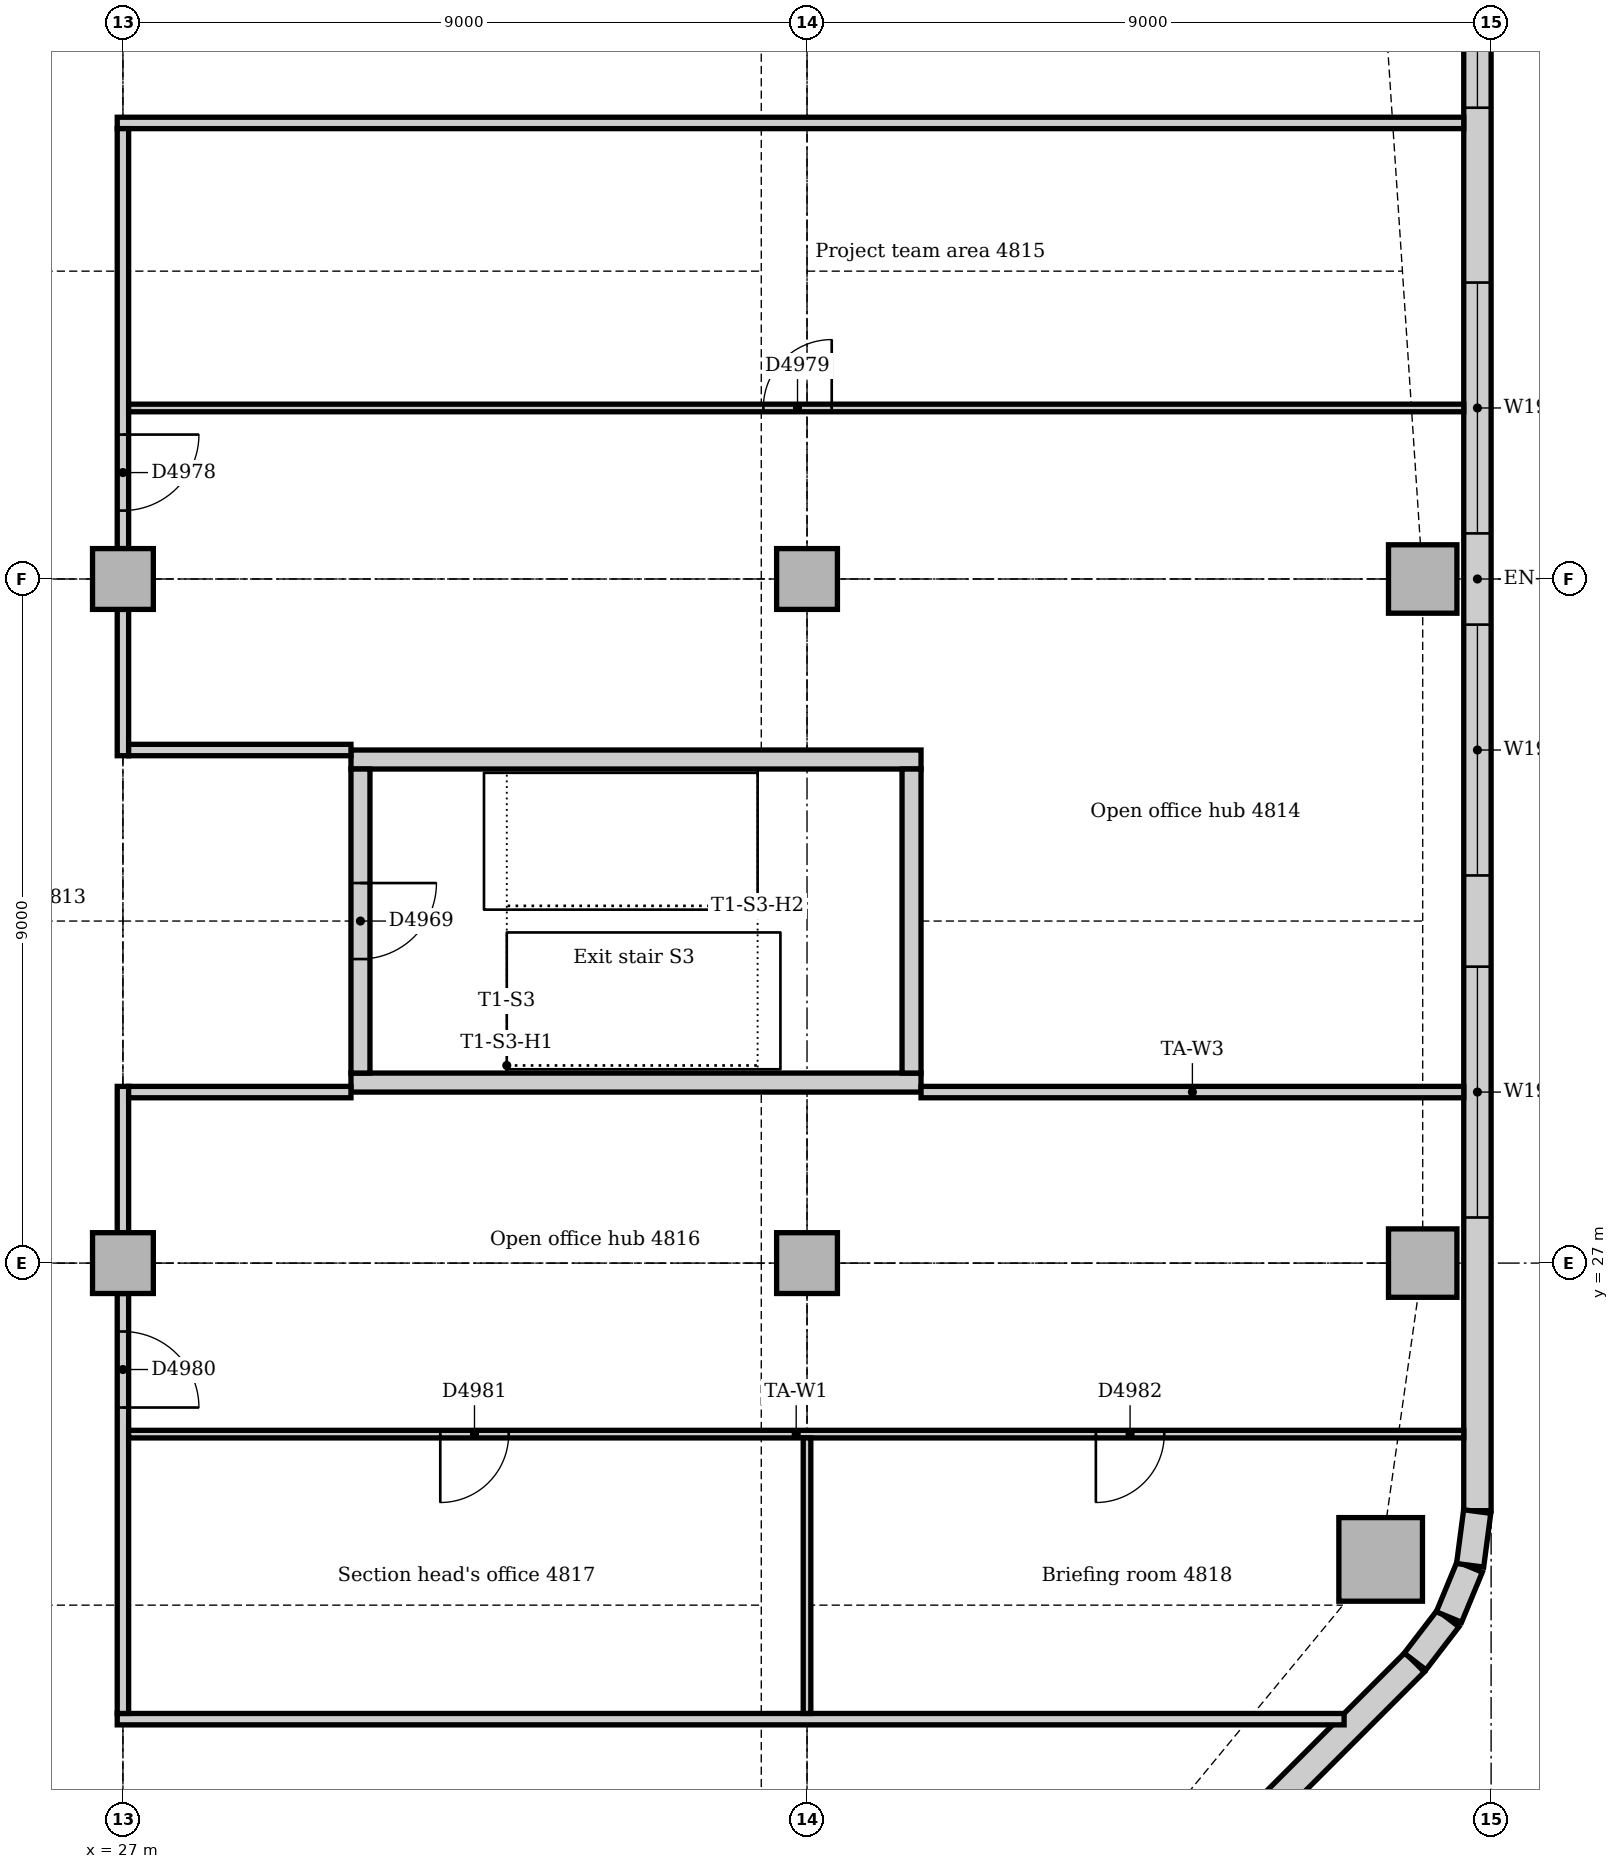
"""IFC4 building model, lengths in metres.
Left out: names, types, materials, properties, quantities, classifications, styles, units other than length and angle.
Written with IfcOpenShell. Run it as: python <this file> out.ifc"""

import sys

from ifc_helpers import new_model, si_unit, direction, frame, frame_2d, origin, origin_2d, place, context, subcontext, project, spatial, rectangle, extrude, element, fill, save


model = new_model("IFC4")
c1 = context("Model", 3, precision=1e-05, world=origin(), true_north=direction((0.0, 1.0)))
c2 = subcontext(c1, "Body", "Model", "MODEL_VIEW")
j1 = project(units=[si_unit("LENGTHUNIT", "METRE"), si_unit("PLANEANGLEUNIT", "RADIAN")], contexts=[c1])
p1 = place(None, origin())
s1 = spatial("IfcSite", under=j1, at=p1, CompositionType="ELEMENT")
p2 = place(p1, origin())
s2 = spatial("IfcBuilding", under=s1, at=p2, CompositionType="ELEMENT")
p3 = place(p2, frame((0.0, 0.0, 202.0)))
s3 = spatial("IfcBuildingStorey", under=s2, at=p3, CompositionType="ELEMENT", Elevation=202.0)
for number, where, z_axis, x_axis in (
    (1, (30.0, 29.375, 0.0), (0.0, 0.0, 1.0), (1.0, 0.0, 0.0)),
    (2, (37.5, 33.625, 0.0), (0.0, 0.0, 1.0), (-1.0, 0.0, 0.0)),
):
    element("IfcWall", number, at=place(p3, frame(where, z_axis=z_axis, x_axis=x_axis)), inside=s3, PredefinedType="SOLIDWALL", context=c2, shape_type="SweptSolid", body=[
        extrude(rectangle(XDim=7.5, YDim=0.25, at=frame_2d((3.75, 0.0))), origin(), (0.0, 0.0, 1.0), 4.0),
    ])
p4 = place(p3, frame((37.375, 29.5, 0.0), z_axis=(0.0, 0.0, 1.0), x_axis=(0.0, 1.0, 0.0)))
e3 = element("IfcWall", 3, at=p4, inside=s3, PredefinedType="SOLIDWALL", context=c2, shape_type="SweptSolid", body=[
    extrude(rectangle(XDim=4.0, YDim=0.25, at=frame_2d((2.0, 0.0))), origin(), (0.0, 0.0, 1.0), 4.0),
])
p5 = place(p3, frame((30.125, 33.5, 0.0), z_axis=(0.0, 0.0, 1.0), x_axis=(0.0, -1.0, 0.0)))
e4 = element("IfcWall", 4, at=p5, inside=s3, PredefinedType="SOLIDWALL", context=c2, shape_type="SweptSolid", body=[
    extrude(rectangle(XDim=4.0, YDim=0.25, at=frame_2d((2.0, 0.0))), origin(), (0.0, 0.0, 1.0), 4.0),
])
p6 = place(p5, frame((1.5, 0.0, 0.0)))
e5 = element("IfcOpeningElement", 5, at=p6, cuts=e4, PredefinedType="OPENING", context=c2, shape_type="SweptSolid", body=[
    extrude(rectangle(XDim=1.0, YDim=2.1, at=frame_2d((0.5, 1.05))), frame((0.0, 0.135, 0.0), z_axis=(0.0, -1.0, 0.0), x_axis=(1.0, 0.0, 0.0)), (0.0, 0.0, 1.0), 0.27),
])
p7 = place(p3, frame((43.547, 23.102, 0.0), z_axis=(0.0, 0.0, 1.0), x_axis=(1.0, 0.0, 0.0)))
e6 = element("IfcColumn", 6, at=p7, inside=s3, PredefinedType="COLUMN", context=c2, shape_type="SweptSolid", body=[
    extrude(rectangle(XDim=1.1, YDim=1.1, at=origin_2d()), origin(), (0.0, 0.0, 1.0), 3.85),
])
for number, where, z_axis, x_axis in (
    (7, (44.1, 27.0, 0.0), (0.0, 0.0, 1.0), (1.0, 0.0, 0.0)),
    (8, (44.1, 36.0, 0.0), (0.0, 0.0, 1.0), (1.0, 0.0, 0.0)),
):
    element("IfcColumn", number, at=place(p3, frame(where, z_axis=z_axis, x_axis=x_axis)), inside=s3, PredefinedType="COLUMN", context=c2, shape_type="SweptSolid", body=[
        extrude(rectangle(XDim=0.9, YDim=0.9, at=origin_2d()), origin(), (0.0, 0.0, 1.0), 3.85),
    ])
for number, where, z_axis, x_axis in (
    (9, (27.0, 27.0, 0.0), (0.0, 0.0, 1.0), (1.0, 0.0, 0.0)),
    (10, (27.0, 36.0, 0.0), (0.0, 0.0, 1.0), (1.0, 0.0, 0.0)),
    (11, (36.0, 27.0, 0.0), (0.0, 0.0, 1.0), (1.0, 0.0, 0.0)),
    (12, (36.0, 36.0, 0.0), (0.0, 0.0, 1.0), (1.0, 0.0, 0.0)),
):
    element("IfcColumn", number, at=place(p3, frame(where, z_axis=z_axis, x_axis=x_axis)), inside=s3, PredefinedType="COLUMN", context=c2, shape_type="SweptSolid", body=[
        extrude(rectangle(XDim=0.8, YDim=0.8, at=origin_2d()), origin(), (0.0, 0.0, 1.0), 3.85),
    ])
p8 = place(p3, frame((36.751, 14.506, 0.0), z_axis=(0.0, 0.0, 1.0), x_axis=(0.707106781187, 0.707106781187, 0.0)))
e13 = element("IfcWall", 13, at=p8, inside=s3, PredefinedType="STANDARD", context=c2, shape_type="SweptSolid", body=[
    extrude(rectangle(XDim=10.243, YDim=0.36, at=frame_2d((5.121, 0.0))), origin(), (0.0, 0.0, 1.0), 3.85),
])
p9 = place(p8, frame((5.021, 0.0, 0.9)))
e14 = element("IfcOpeningElement", 14, at=p9, cuts=e13, PredefinedType="OPENING", context=c2, shape_type="SweptSolid", body=[
    extrude(rectangle(XDim=1.8, YDim=1.6, at=frame_2d((0.9, 0.8))), frame((0.0, 0.19, 0.0), z_axis=(0.0, -1.0, 0.0), x_axis=(1.0, 0.0, 0.0)), (0.0, 0.0, 1.0), 0.38),
])
p10 = place(p3, frame((44.82, 23.743, 0.0), z_axis=(0.0, 0.0, 1.0), x_axis=(0.0, 1.0, 0.0)))
e15 = element("IfcWall", 15, at=p10, inside=s3, PredefinedType="STANDARD", context=c2, shape_type="SweptSolid", body=[
    extrude(rectangle(XDim=24.515, YDim=0.36, at=frame_2d((12.257, 0.0))), origin(), (0.0, 0.0, 1.0), 3.85),
])
p11 = place(p10, frame((3.857, 0.0, 0.9)))
e16 = element("IfcOpeningElement", 16, at=p11, cuts=e15, PredefinedType="OPENING", context=c2, shape_type="SweptSolid", body=[
    extrude(rectangle(XDim=3.3, YDim=1.6, at=frame_2d((1.65, 0.8))), frame((0.0, 0.19, 0.0), z_axis=(0.0, -1.0, 0.0), x_axis=(1.0, 0.0, 0.0)), (0.0, 0.0, 1.0), 0.38),
])
p12 = place(p10, frame((8.357, 0.0, 0.9)))
e17 = element("IfcOpeningElement", 17, at=p12, cuts=e15, PredefinedType="OPENING", context=c2, shape_type="SweptSolid", body=[
    extrude(rectangle(XDim=3.3, YDim=1.6, at=frame_2d((1.65, 0.8))), frame((0.0, 0.19, 0.0), z_axis=(0.0, -1.0, 0.0), x_axis=(1.0, 0.0, 0.0)), (0.0, 0.0, 1.0), 0.38),
])
p13 = place(p10, frame((12.857, 0.0, 0.9)))
e18 = element("IfcOpeningElement", 18, at=p13, cuts=e15, PredefinedType="OPENING", context=c2, shape_type="SweptSolid", body=[
    extrude(rectangle(XDim=3.3, YDim=1.6, at=frame_2d((1.65, 0.8))), frame((0.0, 0.19, 0.0), z_axis=(0.0, -1.0, 0.0), x_axis=(1.0, 0.0, 0.0)), (0.0, 0.0, 1.0), 0.38),
])
p14 = place(p10, frame((18.457, 0.0, 0.9)))
e19 = element("IfcOpeningElement", 19, at=p14, cuts=e15, PredefinedType="OPENING", context=c2, shape_type="SweptSolid", body=[
    extrude(rectangle(XDim=1.8, YDim=1.6, at=frame_2d((0.9, 0.8))), frame((0.0, 0.19, 0.0), z_axis=(0.0, -1.0, 0.0), x_axis=(1.0, 0.0, 0.0)), (0.0, 0.0, 1.0), 0.38),
])
p15 = place(p3, frame((44.0, 21.759, 0.0), z_axis=(0.0, 0.0, 1.0), x_axis=(0.608802368033, 0.793321924995, 0.0)))
e20 = element("IfcWall", 20, at=p15, inside=s3, PredefinedType="STANDARD", context=c2, shape_type="SweptSolid", body=[
    extrude(rectangle(XDim=0.713, YDim=0.36, at=frame_2d((0.357, 0.0))), origin(), (0.0, 0.0, 1.0), 3.85),
])
for number, where, z_axis, x_axis in (
    (21, (44.445, 22.344, 0.0), (0.0, 0.0, 1.0), (0.383, 0.924, 0.0)),
    (22, (44.724, 23.024, 0.0), (0.0, 0.0, 1.0), (0.131, 0.991, 0.0)),
):
    element("IfcWall", number, at=place(p3, frame(where, z_axis=z_axis, x_axis=x_axis)), inside=s3, PredefinedType="STANDARD", context=c2, shape_type="SweptSolid", body=[
        extrude(rectangle(XDim=0.713, YDim=0.36, at=frame_2d((0.356, 0.0))), origin(), (0.0, 0.0, 1.0), 3.85),
    ])
p16 = place(p3, frame((26.925, 42.0, 0.0), z_axis=(0.0, 0.0, 1.0), x_axis=(1.0, 0.0, 0.0)))
e23 = element("IfcWall", 23, at=p16, inside=s3, PredefinedType="PARTITIONING", context=c2, shape_type="SweptSolid", body=[
    extrude(rectangle(XDim=17.715, YDim=0.15, at=frame_2d((8.857, 0.0))), origin(), (0.0, 0.0, 1.0), 3.85),
])
p17 = place(p3, frame((26.925, 21.0, 0.0), z_axis=(0.0, 0.0, 1.0), x_axis=(1.0, 0.0, 0.0)))
e24 = element("IfcWall", 24, at=p17, inside=s3, PredefinedType="PARTITIONING", context=c2, shape_type="SweptSolid", body=[
    extrude(rectangle(XDim=16.141, YDim=0.15, at=frame_2d((8.07, 0.0))), origin(), (0.0, 0.0, 1.0), 3.85),
])
p18 = place(p3, frame((27.0, 21.075, 0.0), z_axis=(0.0, 0.0, 1.0), x_axis=(0.0, 1.0, 0.0)))
e25 = element("IfcWall", 25, at=p18, inside=s3, PredefinedType="PARTITIONING", context=c2, shape_type="SweptSolid", body=[
    extrude(rectangle(XDim=5.525, YDim=0.15, at=frame_2d((2.763, 0.0))), origin(), (0.0, 0.0, 1.0), 3.35),
])
p19 = place(p18, frame((4.025, 0.0, 0.0)))
e26 = element("IfcOpeningElement", 26, at=p19, cuts=e25, PredefinedType="OPENING", context=c2, shape_type="SweptSolid", body=[
    extrude(rectangle(XDim=1.0, YDim=2.1, at=frame_2d((0.5, 1.05))), frame((0.0, 0.085, 0.0), z_axis=(0.0, -1.0, 0.0), x_axis=(1.0, 0.0, 0.0)), (0.0, 0.0, 1.0), 0.17),
])
for number, where, z_axis, x_axis in (
    (27, (27.0, 27.4, 0.0), (0.0, 0.0, 1.0), (0.0, 1.0, 0.0)),
    (28, (27.0, 33.675, 0.0), (0.0, 0.0, 1.0), (0.0, 1.0, 0.0)),
):
    element("IfcWall", number, at=place(p3, frame(where, z_axis=z_axis, x_axis=x_axis)), inside=s3, PredefinedType="PARTITIONING", context=c2, shape_type="SweptSolid", body=[
        extrude(rectangle(XDim=1.925, YDim=0.15, at=frame_2d((0.963, 0.0))), origin(), (0.0, 0.0, 1.0), 3.35),
    ])
p20 = place(p3, frame((27.0, 36.4, 0.0), z_axis=(0.0, 0.0, 1.0), x_axis=(0.0, 1.0, 0.0)))
e29 = element("IfcWall", 29, at=p20, inside=s3, PredefinedType="PARTITIONING", context=c2, shape_type="SweptSolid", body=[
    extrude(rectangle(XDim=5.525, YDim=0.15, at=frame_2d((2.763, 0.0))), origin(), (0.0, 0.0, 1.0), 3.35),
])
p21 = place(p20, frame((0.5, 0.0, 0.0)))
e30 = element("IfcOpeningElement", 30, at=p21, cuts=e29, PredefinedType="OPENING", context=c2, shape_type="SweptSolid", body=[
    extrude(rectangle(XDim=1.0, YDim=2.1, at=frame_2d((0.5, 1.05))), frame((0.0, 0.085, 0.0), z_axis=(0.0, -1.0, 0.0), x_axis=(1.0, 0.0, 0.0)), (0.0, 0.0, 1.0), 0.17),
])
for number, where, z_axis, x_axis in (
    (31, (27.075, 29.25, 0.0), (0.0, 0.0, 1.0), (1.0, 0.0, 0.0)),
    (32, (27.075, 33.75, 0.0), (0.0, 0.0, 1.0), (1.0, 0.0, 0.0)),
):
    element("IfcWall", number, at=place(p3, frame(where, z_axis=z_axis, x_axis=x_axis)), inside=s3, PredefinedType="PARTITIONING", context=c2, shape_type="SweptSolid", body=[
        extrude(rectangle(XDim=2.925, YDim=0.15, at=frame_2d((1.462, 0.0))), origin(), (0.0, 0.0, 1.0), 3.85),
    ])
p22 = place(p3, frame((37.5, 29.25, 0.0), z_axis=(0.0, 0.0, 1.0), x_axis=(1.0, 0.0, 0.0)))
e33 = element("IfcWall", 33, at=p22, inside=s3, PredefinedType="PARTITIONING", context=c2, shape_type="SweptSolid", body=[
    extrude(rectangle(XDim=7.14, YDim=0.15, at=frame_2d((3.57, 0.0))), origin(), (0.0, 0.0, 1.0), 3.85),
])
p23 = place(p3, frame((27.075, 24.75, 0.0), z_axis=(0.0, 0.0, 1.0), x_axis=(1.0, 0.0, 0.0)))
e34 = element("IfcWall", 34, at=p23, inside=s3, PredefinedType="PARTITIONING", context=c2, shape_type="SweptSolid", body=[
    extrude(rectangle(XDim=17.565, YDim=0.1, at=frame_2d((8.783, 0.0))), origin(), (0.0, 0.0, 1.0), 3.85),
])
p24 = place(p23, frame((4.1, 0.0, 0.0)))
e35 = element("IfcOpeningElement", 35, at=p24, cuts=e34, PredefinedType="OPENING", context=c2, shape_type="SweptSolid", body=[
    extrude(rectangle(XDim=0.9, YDim=2.1, at=frame_2d((0.45, 1.05))), frame((0.0, 0.06, 0.0), z_axis=(0.0, -1.0, 0.0), x_axis=(1.0, 0.0, 0.0)), (0.0, 0.0, 1.0), 0.12),
])
p25 = place(p23, frame((12.725, 0.0, 0.0)))
e36 = element("IfcOpeningElement", 36, at=p25, cuts=e34, PredefinedType="OPENING", context=c2, shape_type="SweptSolid", body=[
    extrude(rectangle(XDim=0.9, YDim=2.1, at=frame_2d((0.45, 1.05))), frame((0.0, 0.06, 0.0), z_axis=(0.0, -1.0, 0.0), x_axis=(1.0, 0.0, 0.0)), (0.0, 0.0, 1.0), 0.12),
])
p26 = place(p3, frame((27.075, 38.25, 0.0), z_axis=(0.0, 0.0, 1.0), x_axis=(1.0, 0.0, 0.0)))
e37 = element("IfcWall", 37, at=p26, inside=s3, PredefinedType="PARTITIONING", context=c2, shape_type="SweptSolid", body=[
    extrude(rectangle(XDim=17.565, YDim=0.1, at=frame_2d((8.783, 0.0))), origin(), (0.0, 0.0, 1.0), 3.85),
])
p27 = place(p26, frame((8.35, 0.0, 0.0)))
e38 = element("IfcOpeningElement", 38, at=p27, cuts=e37, PredefinedType="OPENING", context=c2, shape_type="SweptSolid", body=[
    extrude(rectangle(XDim=0.9, YDim=2.1, at=frame_2d((0.45, 1.05))), frame((0.0, 0.06, 0.0), z_axis=(0.0, -1.0, 0.0), x_axis=(1.0, 0.0, 0.0)), (0.0, 0.0, 1.0), 0.12),
])
p28 = place(p3, frame((36.0, 21.075, 0.0), z_axis=(0.0, 0.0, 1.0), x_axis=(0.0, 1.0, 0.0)))
e39 = element("IfcWall", 39, at=p28, inside=s3, PredefinedType="PARTITIONING", context=c2, shape_type="SweptSolid", body=[
    extrude(rectangle(XDim=3.625, YDim=0.1, at=frame_2d((1.812, 0.0))), origin(), (0.0, 0.0, 1.0), 3.35),
])
p29 = place(p11, origin())
e40 = element("IfcWindow", 40, at=p29, inside=s3, PartitioningType="SINGLE_PANEL", PredefinedType="WINDOW", context=c2, shape_type="SweptSolid", body=[
    extrude(rectangle(XDim=3.3, YDim=1.6, at=frame_2d((1.65, 0.8))), frame((0.0, 0.13, 0.0), z_axis=(0.0, -1.0, 0.0), x_axis=(1.0, 0.0, 0.0)), (0.0, 0.0, 1.0), 0.06),
])
fill(e16, e40)
p30 = place(p12, origin())
e41 = element("IfcWindow", 41, at=p30, inside=s3, PartitioningType="SINGLE_PANEL", PredefinedType="WINDOW", context=c2, shape_type="SweptSolid", body=[
    extrude(rectangle(XDim=3.3, YDim=1.6, at=frame_2d((1.65, 0.8))), frame((0.0, 0.13, 0.0), z_axis=(0.0, -1.0, 0.0), x_axis=(1.0, 0.0, 0.0)), (0.0, 0.0, 1.0), 0.06),
])
fill(e17, e41)
p31 = place(p13, origin())
e42 = element("IfcWindow", 42, at=p31, inside=s3, PartitioningType="SINGLE_PANEL", PredefinedType="WINDOW", context=c2, shape_type="SweptSolid", body=[
    extrude(rectangle(XDim=3.3, YDim=1.6, at=frame_2d((1.65, 0.8))), frame((0.0, 0.13, 0.0), z_axis=(0.0, -1.0, 0.0), x_axis=(1.0, 0.0, 0.0)), (0.0, 0.0, 1.0), 0.06),
])
fill(e18, e42)
p32 = place(p14, origin())
e43 = element("IfcWindow", 43, at=p32, inside=s3, PartitioningType="SINGLE_PANEL", PredefinedType="WINDOW", context=c2, shape_type="SweptSolid", body=[
    extrude(rectangle(XDim=1.8, YDim=1.6, at=frame_2d((0.9, 0.8))), frame((0.0, 0.13, 0.0), z_axis=(0.0, -1.0, 0.0), x_axis=(1.0, 0.0, 0.0)), (0.0, 0.0, 1.0), 0.06),
])
fill(e19, e43)
p33 = place(p6, origin())
e44 = element("IfcDoor", 44, at=p33, inside=s3, OperationType="SINGLE_SWING_LEFT", PredefinedType="DOOR", context=c2, shape_type="SweptSolid", body=[
    extrude(rectangle(XDim=1.0, YDim=2.1, at=frame_2d((0.5, 1.05))), frame((0.0, 0.025, 0.0), z_axis=(0.0, -1.0, 0.0), x_axis=(1.0, 0.0, 0.0)), (0.0, 0.0, 1.0), 0.05),
])
fill(e5, e44)
p34 = place(p21, frame((1.0, 0.0, 0.0), z_axis=(0.0, 0.0, 1.0), x_axis=(-1.0, 0.0, 0.0)))
e45 = element("IfcDoor", 45, at=p34, inside=s3, OperationType="SINGLE_SWING_LEFT", PredefinedType="DOOR", context=c2, shape_type="SweptSolid", body=[
    extrude(rectangle(XDim=1.0, YDim=2.1, at=frame_2d((0.5, 1.05))), frame((0.0, 0.025, 0.0), z_axis=(0.0, -1.0, 0.0), x_axis=(1.0, 0.0, 0.0)), (0.0, 0.0, 1.0), 0.05),
])
fill(e30, e45)
p35 = place(p27, origin())
e46 = element("IfcDoor", 46, at=p35, inside=s3, OperationType="SINGLE_SWING_RIGHT", PredefinedType="DOOR", context=c2, shape_type="SweptSolid", body=[
    extrude(rectangle(XDim=0.9, YDim=2.1, at=frame_2d((0.45, 1.05))), frame((0.0, 0.025, 0.0), z_axis=(0.0, -1.0, 0.0), x_axis=(1.0, 0.0, 0.0)), (0.0, 0.0, 1.0), 0.05),
])
fill(e38, e46)
p36 = place(p19, frame((1.0, 0.0, 0.0), z_axis=(0.0, 0.0, 1.0), x_axis=(-1.0, 0.0, 0.0)))
e47 = element("IfcDoor", 47, at=p36, inside=s3, OperationType="SINGLE_SWING_RIGHT", PredefinedType="DOOR", context=c2, shape_type="SweptSolid", body=[
    extrude(rectangle(XDim=1.0, YDim=2.1, at=frame_2d((0.5, 1.05))), frame((0.0, 0.025, 0.0), z_axis=(0.0, -1.0, 0.0), x_axis=(1.0, 0.0, 0.0)), (0.0, 0.0, 1.0), 0.05),
])
fill(e26, e47)
p37 = place(p24, frame((0.9, 0.0, 0.0), z_axis=(0.0, 0.0, 1.0), x_axis=(-1.0, 0.0, 0.0)))
e48 = element("IfcDoor", 48, at=p37, inside=s3, OperationType="SINGLE_SWING_RIGHT", PredefinedType="DOOR", context=c2, shape_type="SweptSolid", body=[
    extrude(rectangle(XDim=0.9, YDim=2.1, at=frame_2d((0.45, 1.05))), frame((0.0, 0.025, 0.0), z_axis=(0.0, -1.0, 0.0), x_axis=(1.0, 0.0, 0.0)), (0.0, 0.0, 1.0), 0.05),
])
fill(e35, e48)
p38 = place(p25, frame((0.9, 0.0, 0.0), z_axis=(0.0, 0.0, 1.0), x_axis=(-1.0, 0.0, 0.0)))
e49 = element("IfcDoor", 49, at=p38, inside=s3, OperationType="SINGLE_SWING_RIGHT", PredefinedType="DOOR", context=c2, shape_type="SweptSolid", body=[
    extrude(rectangle(XDim=0.9, YDim=2.1, at=frame_2d((0.45, 1.05))), frame((0.0, 0.025, 0.0), z_axis=(0.0, -1.0, 0.0), x_axis=(1.0, 0.0, 0.0)), (0.0, 0.0, 1.0), 0.05),
])
fill(e36, e49)
save(model, sys.argv[1])
